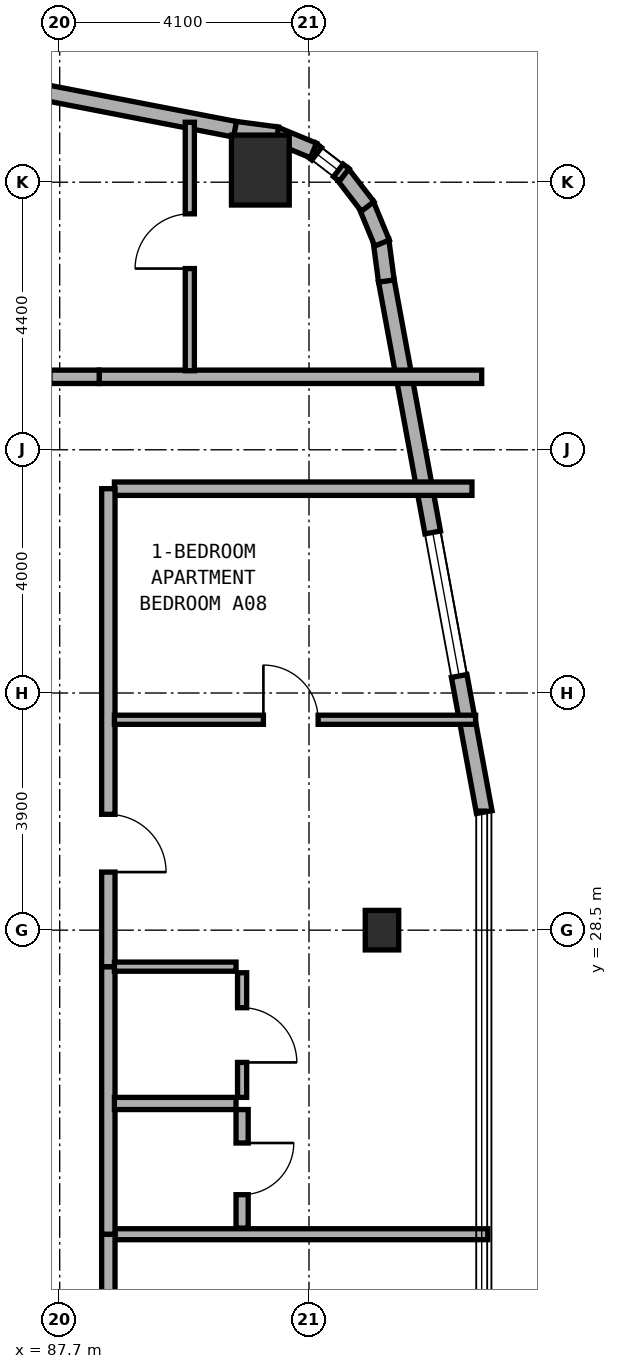
"""IFC4 building model, lengths in metres.
Left out: names, types, materials, properties, quantities, classifications, styles, units other than length and angle.
Written with IfcOpenShell. Run it as: python <this file> out.ifc"""

import sys

from ifc_helpers import new_model, si_unit, direction, frame, frame_2d, origin, origin_2d, place, context, subcontext, project, spatial, rectangle, extrude, element, fill, save


model = new_model("IFC4")
c1 = context("Model", 3, precision=1e-05, world=origin(), true_north=direction((0.0, 1.0)))
c2 = subcontext(c1, "Body", "Model", "MODEL_VIEW")
j1 = project(units=[si_unit("LENGTHUNIT", "METRE"), si_unit("PLANEANGLEUNIT", "RADIAN")], contexts=[c1])
p1 = place(None, origin())
s1 = spatial("IfcSite", under=j1, at=p1, CompositionType="ELEMENT")
p2 = place(p1, origin())
s2 = spatial("IfcBuilding", under=s1, at=p2, CompositionType="ELEMENT")
p3 = place(p2, frame((0.0, 0.0, 116.0)))
s3 = spatial("IfcBuildingStorey", under=s2, at=p3, CompositionType="ELEMENT", Elevation=116.0)
p4 = place(p3, frame((93.0, 28.5, 0.0), z_axis=(0.0, 0.0, 1.0), x_axis=(1.0, 0.0, 0.0)))
e1 = element("IfcColumn", 1, at=p4, inside=s3, PredefinedType="COLUMN", context=c2, shape_type="SweptSolid", body=[
    extrude(rectangle(XDim=0.55, YDim=0.65, at=origin_2d()), origin(), (0.0, 0.0, 1.0), 3.5),
])
p5 = place(p3, frame((91.0, 41.0, 0.0), z_axis=(0.0, 0.0, 1.0), x_axis=(1.0, 0.0, 0.0)))
e2 = element("IfcColumn", 2, at=p5, inside=s3, PredefinedType="COLUMN", context=c2, shape_type="SweptSolid", body=[
    extrude(rectangle(XDim=0.95, YDim=1.15, at=origin_2d()), origin(), (0.0, 0.0, 1.0), 3.5),
])
p6 = place(p3, frame((94.682, 30.442, 0.0), z_axis=(0.0, 0.0, 1.0), x_axis=(-0.181209963057, 0.983444431215, 0.0)))
e3 = element("IfcWall", 3, at=p6, inside=s3, PredefinedType="STANDARD", context=c2, shape_type="SweptSolid", body=[
    extrude(rectangle(XDim=8.889, YDim=0.26, at=frame_2d((4.445, 0.0))), origin(), (0.0, 0.0, 1.0), 3.18),
])
p7 = place(p6, frame((2.276, 0.0, 0.8)))
e4 = element("IfcOpeningElement", 4, at=p7, cuts=e3, PredefinedType="OPENING", context=c2, shape_type="SweptSolid", body=[
    extrude(rectangle(XDim=2.4, YDim=1.6, at=frame_2d((1.2, 0.8))), frame((0.0, 0.14, 0.0), z_axis=(0.0, -1.0, 0.0), x_axis=(1.0, 0.0, 0.0)), (0.0, 0.0, 1.0), 0.28),
])
p8 = place(p3, frame((93.072, 39.175, 0.0), z_axis=(0.0, 0.0, 1.0), x_axis=(-0.131667498923, 0.991293937098, 0.0)))
e5 = element("IfcWall", 5, at=p8, inside=s3, PredefinedType="STANDARD", context=c2, shape_type="SweptSolid", body=[
    extrude(rectangle(XDim=0.677, YDim=0.26, at=frame_2d((0.338, 0.0))), origin(), (0.0, 0.0, 1.0), 3.18),
])
p9 = place(p3, frame((93.001, 39.8, 0.0), z_axis=(0.0, 0.0, 1.0), x_axis=(-0.381988976935, 0.924166879681, 0.0)))
e6 = element("IfcWall", 6, at=p9, inside=s3, PredefinedType="STANDARD", context=c2, shape_type="SweptSolid", body=[
    extrude(rectangle(XDim=0.693, YDim=0.26, at=frame_2d((0.347, 0.0))), origin(), (0.0, 0.0, 1.0), 3.18),
])
p10 = place(p3, frame((92.764, 40.401, 0.0), z_axis=(0.0, 0.0, 1.0), x_axis=(-0.609472651958, 0.792807092876, 0.0)))
e7 = element("IfcWall", 7, at=p10, inside=s3, PredefinedType="STANDARD", context=c2, shape_type="SweptSolid", body=[
    extrude(rectangle(XDim=0.694, YDim=0.26, at=frame_2d((0.347, 0.0))), origin(), (0.0, 0.0, 1.0), 3.18),
])
p11 = place(p3, frame((92.379, 40.92, 0.0), z_axis=(0.0, 0.0, 1.0), x_axis=(-0.792506234191, 0.609863811657, 0.0)))
e8 = element("IfcWall", 8, at=p11, inside=s3, PredefinedType="STANDARD", context=c2, shape_type="SweptSolid", body=[
    extrude(rectangle(XDim=0.694, YDim=0.26, at=frame_2d((0.347, 0.0))), origin(), (0.0, 0.0, 1.0), 3.18),
])
p12 = place(p11, frame((0.122, 0.0, 0.85)))
e9 = element("IfcOpeningElement", 9, at=p12, cuts=e8, PredefinedType="OPENING", context=c2, shape_type="SweptSolid", body=[
    extrude(rectangle(XDim=0.45, YDim=1.5, at=frame_2d((0.225, 0.75))), frame((0.0, 0.14, 0.0), z_axis=(0.0, -1.0, 0.0), x_axis=(1.0, 0.0, 0.0)), (0.0, 0.0, 1.0), 0.28),
])
p13 = place(p3, frame((91.873, 41.322, 0.0), z_axis=(0.0, 0.0, 1.0), x_axis=(-0.92421822618, 0.381864727877, 0.0)))
e10 = element("IfcWall", 10, at=p13, inside=s3, PredefinedType="STANDARD", context=c2, shape_type="SweptSolid", body=[
    extrude(rectangle(XDim=0.694, YDim=0.26, at=frame_2d((0.347, 0.0))), origin(), (0.0, 0.0, 1.0), 3.18),
])
p14 = place(p3, frame((91.281, 41.579, 0.0), z_axis=(0.0, 0.0, 1.0), x_axis=(-0.991433279471, 0.130614135366, 0.0)))
e11 = element("IfcWall", 11, at=p14, inside=s3, PredefinedType="STANDARD", context=c2, shape_type="SweptSolid", body=[
    extrude(rectangle(XDim=0.712, YDim=0.26, at=frame_2d((0.356, 0.0))), origin(), (0.0, 0.0, 1.0), 3.18),
])
p15 = place(p3, frame((90.583, 41.67, 0.0), z_axis=(0.0, 0.0, 1.0), x_axis=(-0.981750199588, 0.190175039396, 0.0)))
e12 = element("IfcWall", 12, at=p15, inside=s3, PredefinedType="STANDARD", context=c2, shape_type="SweptSolid", body=[
    extrude(rectangle(XDim=8.477, YDim=0.26, at=frame_2d((4.238, 0.0))), origin(), (0.0, 0.0, 1.0), 3.18),
])
p16 = place(p15, frame((3.454, 0.0, 0.8)))
e13 = element("IfcOpeningElement", 13, at=p16, cuts=e12, PredefinedType="OPENING", context=c2, shape_type="SweptSolid", body=[
    extrude(rectangle(XDim=2.4, YDim=1.6, at=frame_2d((1.2, 0.8))), frame((0.0, 0.14, 0.0), z_axis=(0.0, -1.0, 0.0), x_axis=(1.0, 0.0, 0.0)), (0.0, 0.0, 1.0), 0.28),
])
p17 = place(p3, frame((88.35, 37.6, 0.0), z_axis=(0.0, 0.0, 1.0), x_axis=(1.0, 0.0, 0.0)))
e14 = element("IfcWall", 14, at=p17, inside=s3, PredefinedType="SOLIDWALL", context=c2, shape_type="SweptSolid", body=[
    extrude(rectangle(XDim=6.29, YDim=0.22, at=frame_2d((3.145, 0.0))), origin(), (0.0, 0.0, 1.0), 2.875),
])
p18 = place(p3, frame((85.78, 37.6, 0.0), z_axis=(0.0, 0.0, 1.0), x_axis=(1.0, 0.0, 0.0)))
e15 = element("IfcWall", 15, at=p18, inside=s3, PredefinedType="SOLIDWALL", context=c2, shape_type="SweptSolid", body=[
    extrude(rectangle(XDim=2.57, YDim=0.22, at=frame_2d((1.285, 0.0))), origin(), (0.0, 0.0, 1.0), 3.18),
])
p19 = place(p18, frame((0.81, 0.0, 0.0)))
e16 = element("IfcOpeningElement", 16, at=p19, cuts=e15, PredefinedType="OPENING", context=c2, shape_type="SweptSolid", body=[
    extrude(rectangle(XDim=0.95, YDim=2.1, at=frame_2d((0.475, 1.05))), frame((0.0, 0.12, 0.0), z_axis=(0.0, -1.0, 0.0), x_axis=(1.0, 0.0, 0.0)), (0.0, 0.0, 1.0), 0.24),
])
p20 = place(p3, frame((89.84, 37.7, 0.0), z_axis=(0.0, 0.0, 1.0), x_axis=(0.0, 1.0, 0.0)))
e17 = element("IfcWall", 17, at=p20, inside=s3, PredefinedType="PARTITIONING", context=c2, shape_type="SweptSolid", body=[
    extrude(rectangle(XDim=4.086, YDim=0.15, at=frame_2d((2.043, 0.0))), origin(), (0.0, 0.0, 1.0), 2.875),
])
p21 = place(p20, frame((1.68, 0.0, 0.0)))
e18 = element("IfcOpeningElement", 18, at=p21, cuts=e17, PredefinedType="OPENING", context=c2, shape_type="SweptSolid", body=[
    extrude(rectangle(XDim=0.9, YDim=2.1, at=frame_2d((0.45, 1.05))), frame((0.0, 0.085, 0.0), z_axis=(0.0, -1.0, 0.0), x_axis=(1.0, 0.0, 0.0)), (0.0, 0.0, 1.0), 0.17),
])
p22 = place(p3, frame((88.6, 35.76, 0.0), z_axis=(0.0, 0.0, 1.0), x_axis=(1.0, 0.0, 0.0)))
e19 = element("IfcWall", 19, at=p22, inside=s3, PredefinedType="SOLIDWALL", context=c2, shape_type="SweptSolid", body=[
    extrude(rectangle(XDim=5.88, YDim=0.22, at=frame_2d((2.94, 0.0))), origin(), (0.0, 0.0, 1.0), 2.875),
])
p23 = place(p3, frame((88.5, 23.5, 0.0), z_axis=(0.0, 0.0, 1.0), x_axis=(1.0, 0.0, 0.0)))
e20 = element("IfcWall", 20, at=p23, inside=s3, PredefinedType="SOLIDWALL", context=c2, shape_type="SweptSolid", body=[
    extrude(rectangle(XDim=6.24, YDim=0.18, at=frame_2d((3.12, 0.0))), origin(), (0.0, 0.0, 1.0), 2.875),
])
p24 = place(p3, frame((88.5, 18.64, 0.0), z_axis=(0.0, 0.0, 1.0), x_axis=(0.0, 1.0, 0.0)))
e21 = element("IfcWall", 21, at=p24, inside=s3, PredefinedType="SOLIDWALL", context=c2, shape_type="SweptSolid", body=[
    extrude(rectangle(XDim=4.86, YDim=0.22, at=frame_2d((2.43, 0.0))), origin(), (0.0, 0.0, 1.0), 2.755),
])
p25 = place(p24, frame((1.955, 0.0, 0.0)))
e22 = element("IfcOpeningElement", 22, at=p25, cuts=e21, PredefinedType="OPENING", context=c2, shape_type="SweptSolid", body=[
    extrude(rectangle(XDim=0.95, YDim=2.1, at=frame_2d((0.475, 1.05))), frame((0.0, 0.12, 0.0), z_axis=(0.0, -1.0, 0.0), x_axis=(1.0, 0.0, 0.0)), (0.0, 0.0, 1.0), 0.24),
])
p26 = place(p3, frame((88.5, 23.5, 0.0), z_axis=(0.0, 0.0, 1.0), x_axis=(0.0, 1.0, 0.0)))
e23 = element("IfcWall", 23, at=p26, inside=s3, PredefinedType="SOLIDWALL", context=c2, shape_type="SweptSolid", body=[
    extrude(rectangle(XDim=4.4, YDim=0.22, at=frame_2d((2.2, 0.0))), origin(), (0.0, 0.0, 1.0), 3.18),
])
p27 = place(p3, frame((88.5, 27.9, 0.0), z_axis=(0.0, 0.0, 1.0), x_axis=(0.0, 1.0, 0.0)))
e24 = element("IfcWall", 24, at=p27, inside=s3, PredefinedType="SOLIDWALL", context=c2, shape_type="SweptSolid", body=[
    extrude(rectangle(XDim=7.86, YDim=0.22, at=frame_2d((3.93, 0.0))), origin(), (0.0, 0.0, 1.0), 2.755),
])
p28 = place(p27, frame((1.555, 0.0, 0.0)))
e25 = element("IfcOpeningElement", 25, at=p28, cuts=e24, PredefinedType="OPENING", context=c2, shape_type="SweptSolid", body=[
    extrude(rectangle(XDim=0.95, YDim=2.1, at=frame_2d((0.475, 1.05))), frame((0.0, 0.12, 0.0), z_axis=(0.0, -1.0, 0.0), x_axis=(1.0, 0.0, 0.0)), (0.0, 0.0, 1.0), 0.24),
])
p29 = place(p3, frame((88.6, 31.96, 0.0), z_axis=(0.0, 0.0, 1.0), x_axis=(1.0, 0.0, 0.0)))
e26 = element("IfcWall", 26, at=p29, inside=s3, PredefinedType="PARTITIONING", context=c2, shape_type="SweptSolid", body=[
    extrude(rectangle(XDim=5.94, YDim=0.15, at=frame_2d((2.97, 0.0))), origin(), (0.0, 0.0, 1.0), 2.875),
])
p30 = place(p29, frame((2.45, 0.0, 0.0)))
e27 = element("IfcOpeningElement", 27, at=p30, cuts=e26, PredefinedType="OPENING", context=c2, shape_type="SweptSolid", body=[
    extrude(rectangle(XDim=0.9, YDim=2.1, at=frame_2d((0.45, 1.05))), frame((0.0, 0.085, 0.0), z_axis=(0.0, -1.0, 0.0), x_axis=(1.0, 0.0, 0.0)), (0.0, 0.0, 1.0), 0.17),
])
p31 = place(p3, frame((88.6, 25.65, 0.0), z_axis=(0.0, 0.0, 1.0), x_axis=(1.0, 0.0, 0.0)))
e28 = element("IfcWall", 28, at=p31, inside=s3, PredefinedType="PLUMBINGWALL", context=c2, shape_type="SweptSolid", body=[
    extrude(rectangle(XDim=2.0, YDim=0.2, at=frame_2d((1.0, 0.0))), origin(), (0.0, 0.0, 1.0), 3.18),
])
p32 = place(p3, frame((88.6, 27.9, 0.0), z_axis=(0.0, 0.0, 1.0), x_axis=(1.0, 0.0, 0.0)))
e29 = element("IfcWall", 29, at=p32, inside=s3, PredefinedType="PARTITIONING", context=c2, shape_type="SweptSolid", body=[
    extrude(rectangle(XDim=2.0, YDim=0.15, at=frame_2d((1.0, 0.0))), origin(), (0.0, 0.0, 1.0), 3.18),
])
p33 = place(p3, frame((90.7, 23.6, 0.0), z_axis=(0.0, 0.0, 1.0), x_axis=(0.0, 1.0, 0.0)))
e30 = element("IfcWall", 30, at=p33, inside=s3, PredefinedType="PLUMBINGWALL", context=c2, shape_type="SweptSolid", body=[
    extrude(rectangle(XDim=1.95, YDim=0.2, at=frame_2d((0.975, 0.0))), origin(), (0.0, 0.0, 1.0), 3.18),
])
p34 = place(p33, frame((0.55, 0.0, 0.0)))
e31 = element("IfcOpeningElement", 31, at=p34, cuts=e30, PredefinedType="OPENING", context=c2, shape_type="SweptSolid", body=[
    extrude(rectangle(XDim=0.85, YDim=2.1, at=frame_2d((0.425, 1.05))), frame((0.0, 0.11, 0.0), z_axis=(0.0, -1.0, 0.0), x_axis=(1.0, 0.0, 0.0)), (0.0, 0.0, 1.0), 0.22),
])
p35 = place(p3, frame((90.7, 25.75, 0.0), z_axis=(0.0, 0.0, 1.0), x_axis=(0.0, 1.0, 0.0)))
e32 = element("IfcWall", 32, at=p35, inside=s3, PredefinedType="PARTITIONING", context=c2, shape_type="SweptSolid", body=[
    extrude(rectangle(XDim=2.05, YDim=0.15, at=frame_2d((1.025, 0.0))), origin(), (0.0, 0.0, 1.0), 3.18),
])
p36 = place(p35, frame((0.575, 0.0, 0.0)))
e33 = element("IfcOpeningElement", 33, at=p36, cuts=e32, PredefinedType="OPENING", context=c2, shape_type="SweptSolid", body=[
    extrude(rectangle(XDim=0.9, YDim=2.1, at=frame_2d((0.45, 1.05))), frame((0.0, 0.085, 0.0), z_axis=(0.0, -1.0, 0.0), x_axis=(1.0, 0.0, 0.0)), (0.0, 0.0, 1.0), 0.17),
])
p37 = place(p7, origin())
e34 = element("IfcWindow", 34, at=p37, inside=s3, PartitioningType="SINGLE_PANEL", PredefinedType="WINDOW", context=c2, shape_type="SweptSolid", body=[
    extrude(rectangle(XDim=2.4, YDim=1.6, at=frame_2d((1.2, 0.8))), frame((0.0, 0.03, 0.0), z_axis=(0.0, -1.0, 0.0), x_axis=(1.0, 0.0, 0.0)), (0.0, 0.0, 1.0), 0.06),
])
fill(e4, e34)
p38 = place(p12, origin())
e35 = element("IfcWindow", 35, at=p38, inside=s3, PartitioningType="SINGLE_PANEL", PredefinedType="WINDOW", context=c2, shape_type="SweptSolid", body=[
    extrude(rectangle(XDim=0.45, YDim=1.5, at=frame_2d((0.225, 0.75))), frame((0.0, 0.03, 0.0), z_axis=(0.0, -1.0, 0.0), x_axis=(1.0, 0.0, 0.0)), (0.0, 0.0, 1.0), 0.06),
])
fill(e9, e35)
p39 = place(p21, origin())
e36 = element("IfcDoor", 36, at=p39, inside=s3, OperationType="SINGLE_SWING_LEFT", PredefinedType="DOOR", context=c2, shape_type="SweptSolid", body=[
    extrude(rectangle(XDim=0.9, YDim=2.1, at=frame_2d((0.45, 1.05))), frame((0.0, 0.025, 0.0), z_axis=(0.0, -1.0, 0.0), x_axis=(1.0, 0.0, 0.0)), (0.0, 0.0, 1.0), 0.05),
])
fill(e18, e36)
p40 = place(p28, frame((0.95, 0.0, 0.0), z_axis=(0.0, 0.0, 1.0), x_axis=(-1.0, 0.0, 0.0)))
e37 = element("IfcDoor", 37, at=p40, inside=s3, OperationType="SINGLE_SWING_RIGHT", PredefinedType="DOOR", context=c2, shape_type="SweptSolid", body=[
    extrude(rectangle(XDim=0.95, YDim=2.1, at=frame_2d((0.475, 1.05))), frame((0.0, 0.025, 0.0), z_axis=(0.0, -1.0, 0.0), x_axis=(1.0, 0.0, 0.0)), (0.0, 0.0, 1.0), 0.05),
])
fill(e25, e37)
p41 = place(p30, origin())
e38 = element("IfcDoor", 38, at=p41, inside=s3, OperationType="SINGLE_SWING_LEFT", PredefinedType="DOOR", context=c2, shape_type="SweptSolid", body=[
    extrude(rectangle(XDim=0.9, YDim=2.1, at=frame_2d((0.45, 1.05))), frame((0.0, 0.025, 0.0), z_axis=(0.0, -1.0, 0.0), x_axis=(1.0, 0.0, 0.0)), (0.0, 0.0, 1.0), 0.05),
])
fill(e27, e38)
p42 = place(p34, frame((0.85, 0.0, 0.0), z_axis=(0.0, 0.0, 1.0), x_axis=(-1.0, 0.0, 0.0)))
e39 = element("IfcDoor", 39, at=p42, inside=s3, OperationType="SINGLE_SWING_LEFT", PredefinedType="DOOR", context=c2, shape_type="SweptSolid", body=[
    extrude(rectangle(XDim=0.85, YDim=2.1, at=frame_2d((0.425, 1.05))), frame((0.0, 0.025, 0.0), z_axis=(0.0, -1.0, 0.0), x_axis=(1.0, 0.0, 0.0)), (0.0, 0.0, 1.0), 0.05),
])
fill(e31, e39)
p43 = place(p36, frame((0.9, 0.0, 0.0), z_axis=(0.0, 0.0, 1.0), x_axis=(-1.0, 0.0, 0.0)))
e40 = element("IfcDoor", 40, at=p43, inside=s3, OperationType="SINGLE_SWING_RIGHT", PredefinedType="DOOR", context=c2, shape_type="SweptSolid", body=[
    extrude(rectangle(XDim=0.9, YDim=2.1, at=frame_2d((0.45, 1.05))), frame((0.0, 0.025, 0.0), z_axis=(0.0, -1.0, 0.0), x_axis=(1.0, 0.0, 0.0)), (0.0, 0.0, 1.0), 0.05),
])
fill(e33, e40)
save(model, sys.argv[1])
